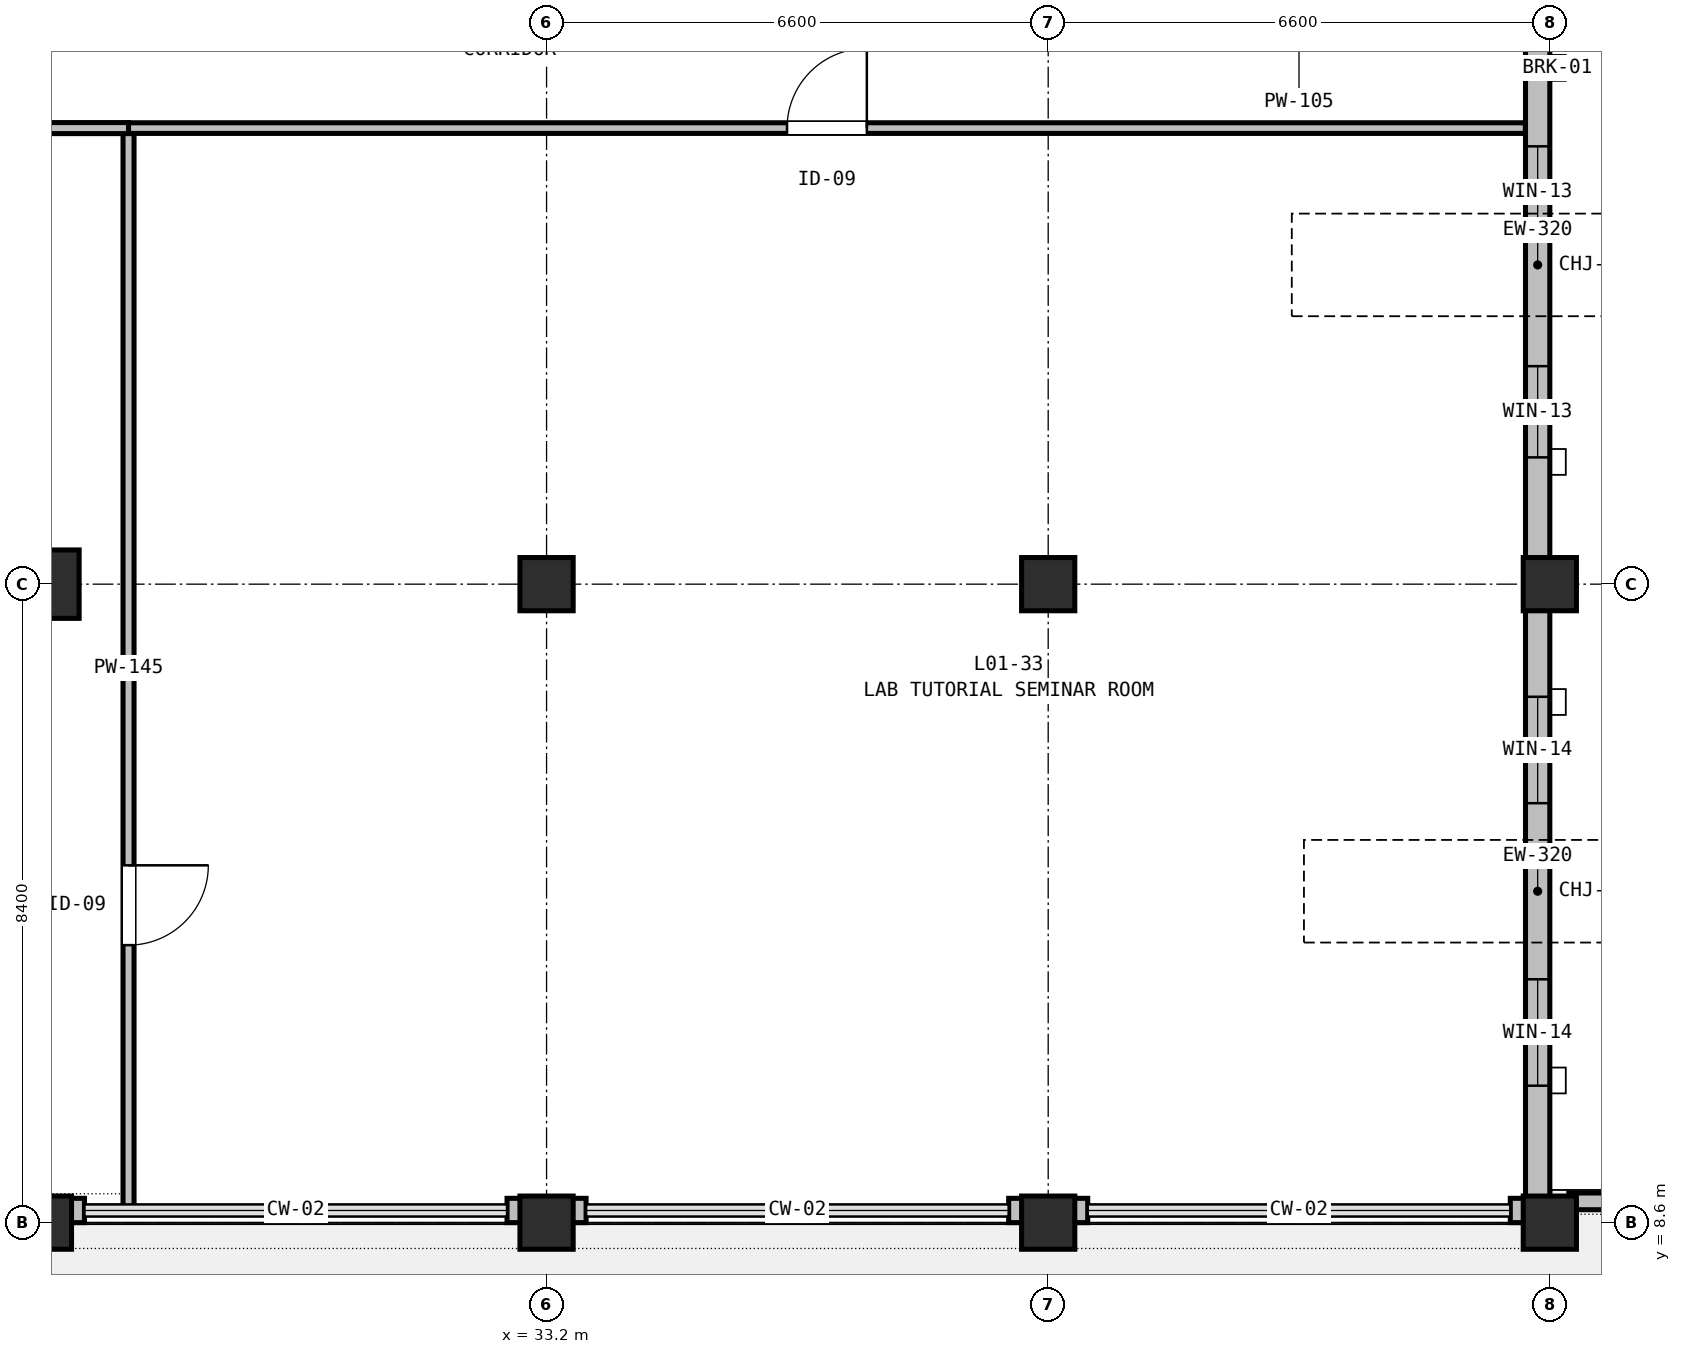
"""IFC4 building model, lengths in metres.
Left out: names, types, materials, properties, quantities, classifications, styles, units other than length and angle.
Written with IfcOpenShell. Run it as: python <this file> out.ifc"""

import sys

from ifc_helpers import new_model, si_unit, direction, frame, frame_2d, origin, origin_2d, place, context, subcontext, project, spatial, rectangle, extrude, element, fill, save


model = new_model("IFC4")
c1 = context("Model", 3, precision=1e-05, world=origin(), true_north=direction((0.0, 1.0)))
c2 = subcontext(c1, "Body", "Model", "MODEL_VIEW")
j1 = project(units=[si_unit("LENGTHUNIT", "METRE"), si_unit("PLANEANGLEUNIT", "RADIAN")], contexts=[c1])
p1 = place(None, origin())
s1 = spatial("IfcSite", under=j1, at=p1, CompositionType="ELEMENT")
p2 = place(p1, origin())
s2 = spatial("IfcBuilding", under=s1, at=p2, CompositionType="ELEMENT")
p3 = place(p2, frame((0.0, 0.0, 5.4)))
s3 = spatial("IfcBuildingStorey", under=s2, at=p3, CompositionType="ELEMENT", Elevation=5.4)
p4 = place(p3, frame((26.6, 8.6, 0.0), z_axis=(0.0, 0.0, 1.0), x_axis=(1.0, 0.0, 0.0)))
e1 = element("IfcColumn", 1, at=p4, inside=s3, PredefinedType="COLUMN", context=c2, shape_type="SweptSolid", body=[
    extrude(rectangle(XDim=0.7, YDim=0.7, at=origin_2d()), origin(), (0.0, 0.0, 1.0), 4.8),
])
p5 = place(p3, frame((26.6, 17.0, 0.0), z_axis=(0.0, 0.0, 1.0), x_axis=(1.0, 0.0, 0.0)))
e2 = element("IfcColumn", 2, at=p5, inside=s3, PredefinedType="COLUMN", context=c2, shape_type="SweptSolid", body=[
    extrude(rectangle(XDim=0.9, YDim=0.9, at=origin_2d()), origin(), (0.0, 0.0, 1.0), 4.8),
])
for number, where, z_axis, x_axis in (
    (3, (33.2, 8.6, 0.0), (0.0, 0.0, 1.0), (1.0, 0.0, 0.0)),
    (4, (33.2, 17.0, 0.0), (0.0, 0.0, 1.0), (1.0, 0.0, 0.0)),
    (5, (39.8, 8.6, 0.0), (0.0, 0.0, 1.0), (1.0, 0.0, 0.0)),
    (6, (39.8, 17.0, 0.0), (0.0, 0.0, 1.0), (1.0, 0.0, 0.0)),
    (7, (46.4, 8.6, 0.0), (0.0, 0.0, 1.0), (1.0, 0.0, 0.0)),
    (8, (46.4, 17.0, 0.0), (0.0, 0.0, 1.0), (1.0, 0.0, 0.0)),
):
    element("IfcColumn", number, at=place(p3, frame(where, z_axis=z_axis, x_axis=x_axis)), inside=s3, PredefinedType="COLUMN", context=c2, shape_type="SweptSolid", body=[
        extrude(rectangle(XDim=0.7, YDim=0.7, at=origin_2d()), origin(), (0.0, 0.0, 1.0), 4.8),
    ])
p6 = place(p3, frame((46.24, 25.4, 0.0), z_axis=(0.0, 0.0, 1.0), x_axis=(0.0, -1.0, 0.0)))
e9 = element("IfcWall", 9, at=p6, inside=s3, PredefinedType="STANDARD", context=c2, shape_type="SweptSolid", body=[
    extrude(rectangle(XDim=8.4, YDim=0.32, at=frame_2d((4.2, 0.0))), origin(), (0.0, 0.0, 1.0), 4.085),
])
p7 = place(p6, frame((2.64, 0.0, 0.9)))
e10 = element("IfcOpeningElement", 10, at=p7, cuts=e9, PredefinedType="OPENING", context=c2, shape_type="SweptSolid", body=[
    extrude(rectangle(XDim=1.2, YDim=1.5, at=frame_2d((0.6, 0.75))), frame((0.0, 0.17, 0.0), z_axis=(0.0, -1.0, 0.0), x_axis=(1.0, 0.0, 0.0)), (0.0, 0.0, 1.0), 0.34),
])
p8 = place(p6, frame((5.532, 0.0, 0.9)))
e11 = element("IfcOpeningElement", 11, at=p8, cuts=e9, PredefinedType="OPENING", context=c2, shape_type="SweptSolid", body=[
    extrude(rectangle(XDim=1.2, YDim=1.5, at=frame_2d((0.6, 0.75))), frame((0.0, 0.17, 0.0), z_axis=(0.0, -1.0, 0.0), x_axis=(1.0, 0.0, 0.0)), (0.0, 0.0, 1.0), 0.34),
])
p9 = place(p3, frame((46.24, 17.0, 0.0), z_axis=(0.0, 0.0, 1.0), x_axis=(0.0, -1.0, 0.0)))
e12 = element("IfcWall", 12, at=p9, inside=s3, PredefinedType="STANDARD", context=c2, shape_type="SweptSolid", body=[
    extrude(rectangle(XDim=8.08, YDim=0.32, at=frame_2d((4.04, 0.0))), origin(), (0.0, 0.0, 1.0), 4.085),
])
p10 = place(p9, frame((1.482, 0.0, 0.9)))
e13 = element("IfcOpeningElement", 13, at=p10, cuts=e12, PredefinedType="OPENING", context=c2, shape_type="SweptSolid", body=[
    extrude(rectangle(XDim=1.4, YDim=1.55, at=frame_2d((0.7, 0.775))), frame((0.0, 0.17, 0.0), z_axis=(0.0, -1.0, 0.0), x_axis=(1.0, 0.0, 0.0)), (0.0, 0.0, 1.0), 0.34),
])
p11 = place(p9, frame((5.198, 0.0, 0.9)))
e14 = element("IfcOpeningElement", 14, at=p11, cuts=e12, PredefinedType="OPENING", context=c2, shape_type="SweptSolid", body=[
    extrude(rectangle(XDim=1.4, YDim=1.55, at=frame_2d((0.7, 0.775))), frame((0.0, 0.17, 0.0), z_axis=(0.0, -1.0, 0.0), x_axis=(1.0, 0.0, 0.0)), (0.0, 0.0, 1.0), 0.34),
])
for number, where, z_axis, x_axis in (
    (15, (46.4, 8.76, 0.0), (0.0, 0.0, 1.0), (-1.0, 0.0, 0.0)),
    (16, (40.32, 8.76, 0.0), (0.0, 0.0, 1.0), (-1.0, 0.0, 0.0)),
    (17, (39.8, 8.76, 0.0), (0.0, 0.0, 1.0), (-1.0, 0.0, 0.0)),
    (18, (33.72, 8.76, 0.0), (0.0, 0.0, 1.0), (-1.0, 0.0, 0.0)),
    (19, (33.2, 8.76, 0.0), (0.0, 0.0, 1.0), (-1.0, 0.0, 0.0)),
    (20, (27.12, 8.76, 0.0), (0.0, 0.0, 1.0), (-1.0, 0.0, 0.0)),
):
    element("IfcWall", number, at=place(p3, frame(where, z_axis=z_axis, x_axis=x_axis)), inside=s3, PredefinedType="STANDARD", context=c2, shape_type="SweptSolid", body=[
        extrude(rectangle(XDim=0.52, YDim=0.32, at=frame_2d((0.26, 0.0))), origin(), (0.0, 0.0, 1.0), 3.935),
    ])
p12 = place(p3, frame((46.65, 8.88, 0.0), z_axis=(0.0, 0.0, 1.0), x_axis=(1.0, 0.0, 0.0)))
e21 = element("IfcWall", 21, at=p12, inside=s3, PredefinedType="PARAPET", context=c2, shape_type="SweptSolid", body=[
    extrude(rectangle(XDim=19.83, YDim=0.22, at=frame_2d((9.915, 0.0))), origin(), (0.0, 0.0, 1.0), 0.68),
])
p13 = place(p3, frame((27.7, 23.0, 0.0), z_axis=(0.0, 0.0, 1.0), x_axis=(0.0, -1.0, 0.0)))
e22 = element("IfcWall", 22, at=p13, inside=s3, PredefinedType="PARTITIONING", context=c2, shape_type="SweptSolid", body=[
    extrude(rectangle(XDim=14.2, YDim=0.145, at=frame_2d((7.1, 0.0))), origin(), (0.0, 0.0, 1.0), 4.085),
])
p14 = place(p13, frame((9.699, 0.0, 0.0)))
e23 = element("IfcOpeningElement", 23, at=p14, cuts=e22, PredefinedType="OPENING", context=c2, shape_type="SweptSolid", body=[
    extrude(rectangle(XDim=1.05, YDim=2.06, at=frame_2d((0.525, 1.03))), frame((0.0, 0.083, 0.0), z_axis=(0.0, -1.0, 0.0), x_axis=(1.0, 0.0, 0.0)), (0.0, 0.0, 1.0), 0.165),
])
p15 = place(p3, frame((15.7, 23.0, 0.0), z_axis=(0.0, 0.0, 1.0), x_axis=(1.0, 0.0, 0.0)))
e24 = element("IfcWall", 24, at=p15, inside=s3, PredefinedType="PARTITIONING", context=c2, shape_type="SweptSolid", body=[
    extrude(rectangle(XDim=12.0, YDim=0.145, at=frame_2d((6.0, 0.0))), origin(), (0.0, 0.0, 1.0), 3.935),
])
p16 = place(p15, frame((5.5, 0.0, 0.0)))
e25 = element("IfcOpeningElement", 25, at=p16, cuts=e24, PredefinedType="OPENING", context=c2, shape_type="SweptSolid", body=[
    extrude(rectangle(XDim=1.0, YDim=2.06, at=frame_2d((0.5, 1.03))), frame((0.0, 0.083, 0.0), z_axis=(0.0, -1.0, 0.0), x_axis=(1.0, 0.0, 0.0)), (0.0, 0.0, 1.0), 0.165),
])
p17 = place(p3, frame((27.7, 23.0, 0.0), z_axis=(0.0, 0.0, 1.0), x_axis=(1.0, 0.0, 0.0)))
e26 = element("IfcWall", 26, at=p17, inside=s3, PredefinedType="PARTITIONING", context=c2, shape_type="SweptSolid", body=[
    extrude(rectangle(XDim=18.378, YDim=0.14, at=frame_2d((9.189, 0.0))), origin(), (0.0, 0.0, 1.0), 3.935),
])
p18 = place(p17, frame((8.664, 0.0, 0.0)))
e27 = element("IfcOpeningElement", 27, at=p18, cuts=e26, PredefinedType="OPENING", context=c2, shape_type="SweptSolid", body=[
    extrude(rectangle(XDim=1.05, YDim=2.06, at=frame_2d((0.525, 1.03))), frame((0.0, 0.08, 0.0), z_axis=(0.0, -1.0, 0.0), x_axis=(1.0, 0.0, 0.0)), (0.0, 0.0, 1.0), 0.16),
])
p19 = place(p7, origin())
e28 = element("IfcWindow", 28, at=p19, inside=s3, PartitioningType="SINGLE_PANEL", PredefinedType="WINDOW", context=c2, shape_type="SweptSolid", body=[
    extrude(rectangle(XDim=1.2, YDim=1.5, at=frame_2d((0.6, 0.75))), frame((0.0, 0.03, 0.0), z_axis=(0.0, -1.0, 0.0), x_axis=(1.0, 0.0, 0.0)), (0.0, 0.0, 1.0), 0.06),
])
fill(e10, e28)
p20 = place(p8, origin())
e29 = element("IfcWindow", 29, at=p20, inside=s3, PartitioningType="SINGLE_PANEL", PredefinedType="WINDOW", context=c2, shape_type="SweptSolid", body=[
    extrude(rectangle(XDim=1.2, YDim=1.5, at=frame_2d((0.6, 0.75))), frame((0.0, 0.03, 0.0), z_axis=(0.0, -1.0, 0.0), x_axis=(1.0, 0.0, 0.0)), (0.0, 0.0, 1.0), 0.06),
])
fill(e11, e29)
p21 = place(p10, origin())
e30 = element("IfcWindow", 30, at=p21, inside=s3, PartitioningType="SINGLE_PANEL", PredefinedType="WINDOW", context=c2, shape_type="SweptSolid", body=[
    extrude(rectangle(XDim=1.4, YDim=1.55, at=frame_2d((0.7, 0.775))), frame((0.0, 0.03, 0.0), z_axis=(0.0, -1.0, 0.0), x_axis=(1.0, 0.0, 0.0)), (0.0, 0.0, 1.0), 0.06),
])
fill(e13, e30)
p22 = place(p11, origin())
e31 = element("IfcWindow", 31, at=p22, inside=s3, PartitioningType="SINGLE_PANEL", PredefinedType="WINDOW", context=c2, shape_type="SweptSolid", body=[
    extrude(rectangle(XDim=1.4, YDim=1.55, at=frame_2d((0.7, 0.775))), frame((0.0, 0.03, 0.0), z_axis=(0.0, -1.0, 0.0), x_axis=(1.0, 0.0, 0.0)), (0.0, 0.0, 1.0), 0.06),
])
fill(e14, e31)
p23 = place(p18, origin())
e32 = element("IfcDoor", 32, at=p23, inside=s3, OperationType="SINGLE_SWING_RIGHT", PredefinedType="DOOR", context=c2, shape_type="SweptSolid", body=[
    extrude(rectangle(XDim=1.05, YDim=2.06, at=frame_2d((0.525, 1.03))), frame((0.0, 0.025, 0.0), z_axis=(0.0, -1.0, 0.0), x_axis=(1.0, 0.0, 0.0)), (0.0, 0.0, 1.0), 0.05),
])
fill(e27, e32)
p24 = place(p14, origin())
e33 = element("IfcDoor", 33, at=p24, inside=s3, OperationType="SINGLE_SWING_LEFT", PredefinedType="DOOR", context=c2, shape_type="SweptSolid", body=[
    extrude(rectangle(XDim=1.05, YDim=2.06, at=frame_2d((0.525, 1.03))), frame((0.0, 0.025, 0.0), z_axis=(0.0, -1.0, 0.0), x_axis=(1.0, 0.0, 0.0)), (0.0, 0.0, 1.0), 0.05),
])
fill(e23, e33)
save(model, sys.argv[1])
